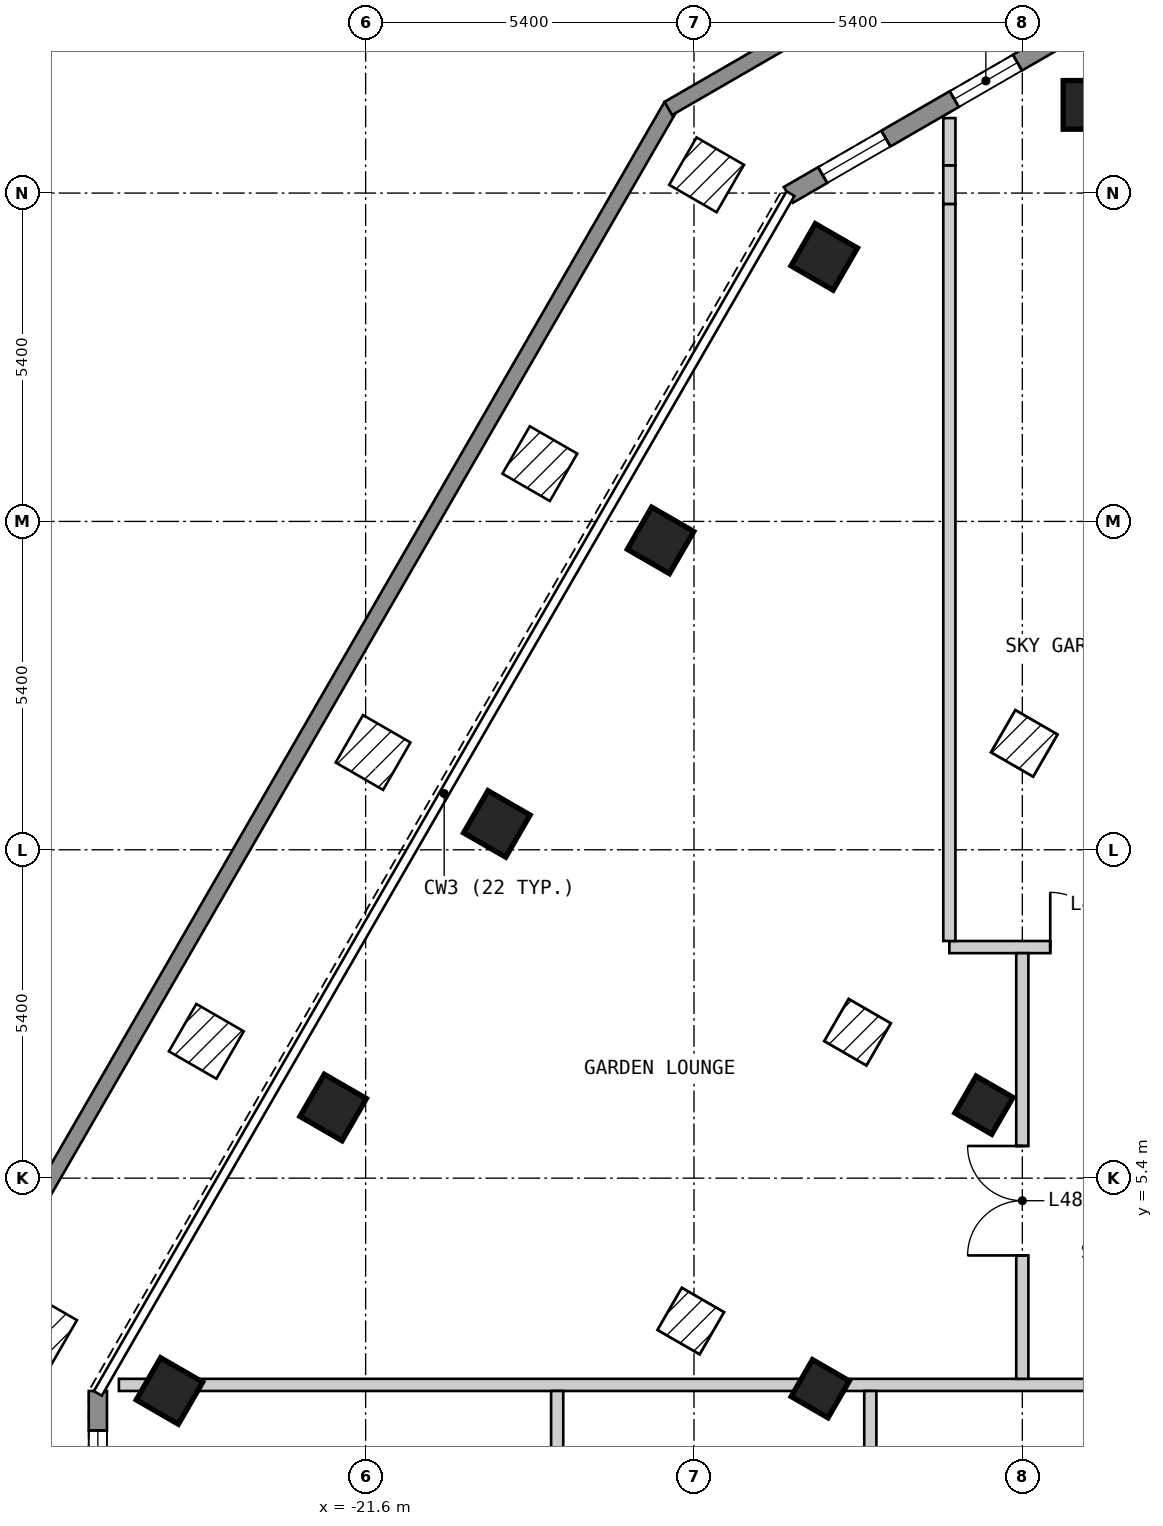
"""IFC4 building model, lengths in metres.
Left out: names, types, materials, properties, quantities, classifications, styles, units other than length and angle.
Written with IfcOpenShell. Run it as: python <this file> out.ifc"""

import sys

from ifc_helpers import new_model, si_unit, direction, frame, frame_2d, origin, origin_2d, place, context, subcontext, project, spatial, polyline, rectangle, outline, extrude, element, fill, save


model = new_model("IFC4")
c1 = context("Model", 3, precision=1e-05, world=origin(), true_north=direction((0.0, 1.0)))
c2 = subcontext(c1, "Body", "Model", "MODEL_VIEW")
j1 = project(units=[si_unit("LENGTHUNIT", "METRE"), si_unit("PLANEANGLEUNIT", "RADIAN")], contexts=[c1])
p1 = place(None, origin())
s1 = spatial("IfcSite", under=j1, at=p1, CompositionType="ELEMENT")
p2 = place(p1, origin())
s2 = spatial("IfcBuilding", under=s1, at=p2, CompositionType="ELEMENT")
p3 = place(p2, frame((0.0, 0.0, 157.2)))
s3 = spatial("IfcBuildingStorey", under=s2, at=p3, CompositionType="ELEMENT", Elevation=157.2)
for number, where, z_axis, x_axis in (
    (1, (-9.728, 23.05, 0.0), (0.0, 0.0, 1.0), (-1.0, 0.0, 0.0)),
    (2, (-14.058, 20.55, 0.0), (0.0, 0.0, 1.0), (-0.5, -0.866, 0.0)),
    (3, (-16.75, 15.888, 0.0), (0.0, 0.0, 1.0), (-0.5, -0.866, 0.0)),
    (4, (-19.442, 11.225, 0.0), (0.0, 0.0, 1.0), (-0.5, -0.866, 0.0)),
    (5, (-22.134, 6.562, 0.0), (0.0, 0.0, 1.0), (-0.5, -0.866, 0.0)),
    (6, (-24.826, 1.9, 0.0), (0.0, 0.0, 1.0), (-0.5, -0.866, 0.0)),
):
    element("IfcColumn", number, at=place(p3, frame(where, z_axis=z_axis, x_axis=x_axis)), inside=s3, PredefinedType="COLUMN", context=c2, shape_type="SweptSolid", body=[
        extrude(rectangle(XDim=0.8, YDim=0.8, at=origin_2d()), origin(), (0.0, 0.0, 1.0), 6.0),
    ])
for number, where, z_axis, x_axis in (
    (7, (-11.431, 6.6, 0.0), (0.0, 0.0, 1.0), (-0.5, -0.866, 0.0)),
    (8, (-14.123, 1.937, 0.0), (0.0, 0.0, 1.0), (-0.5, -0.866, 0.0)),
):
    element("IfcColumn", number, at=place(p3, frame(where, z_axis=z_axis, x_axis=x_axis)), inside=s3, PredefinedType="COLUMN", context=c2, shape_type="SweptSolid", body=[
        extrude(rectangle(XDim=0.7, YDim=0.7, at=origin_2d()), origin(), (0.0, 0.0, 1.0), 6.0),
    ])
p4 = place(p3, frame((-10.317, 24.07, 0.0), z_axis=(0.0, 0.0, 1.0), x_axis=(-0.866022959057, -0.500004234368, 0.0)))
e9 = element("IfcWall", 9, at=p4, inside=s3, PredefinedType="SOLIDWALL", context=c2, shape_type="SweptSolid", body=[
    extrude(outline(polyline([(0.0, -0.15), (5.0, -0.15), (4.92, 0.15), (0.08, 0.15), (0.0, -0.15)])), origin(), (0.0, 0.0, 1.0), 5.7),
])
p5 = place(p4, frame((0.65, 0.0, 0.15)))
e10 = element("IfcOpeningElement", 10, at=p5, cuts=e9, PredefinedType="OPENING", context=c2, shape_type="SweptSolid", body=[
    extrude(rectangle(XDim=1.2, YDim=2.1, at=frame_2d((0.6, 1.05))), frame((0.0, 0.16, 0.0), z_axis=(0.0, -1.0, 0.0), x_axis=(1.0, 0.0, 0.0)), (0.0, 0.0, 1.0), 0.32),
])
p6 = place(p4, frame((3.149, 0.0, 0.15)))
e11 = element("IfcOpeningElement", 11, at=p6, cuts=e9, PredefinedType="OPENING", context=c2, shape_type="SweptSolid", body=[
    extrude(rectangle(XDim=1.2, YDim=2.1, at=frame_2d((0.6, 1.05))), frame((0.0, 0.16, 0.0), z_axis=(0.0, -1.0, 0.0), x_axis=(1.0, 0.0, 0.0)), (0.0, 0.0, 1.0), 0.32),
])
p7 = place(p3, frame((-26.004, 1.9, 0.0), z_axis=(0.0, 0.0, 1.0), x_axis=(0.0, -1.0, 0.0)))
e12 = element("IfcWall", 12, at=p7, inside=s3, PredefinedType="SOLIDWALL", context=c2, shape_type="SweptSolid", body=[
    extrude(outline(polyline([(0.0, -0.15), (5.0, -0.15), (4.92, 0.15), (0.08, 0.15), (0.0, -0.15)])), origin(), (0.0, 0.0, 1.0), 5.7),
])
p8 = place(p7, frame((0.65, 0.0, 0.15)))
e13 = element("IfcOpeningElement", 13, at=p8, cuts=e12, PredefinedType="OPENING", context=c2, shape_type="SweptSolid", body=[
    extrude(rectangle(XDim=1.2, YDim=2.1, at=frame_2d((0.6, 1.05))), frame((0.0, 0.16, 0.0), z_axis=(0.0, -1.0, 0.0), x_axis=(1.0, 0.0, 0.0)), (0.0, 0.0, 1.0), 0.32),
])
p9 = place(p7, frame((3.15, 0.0, 0.15)))
e14 = element("IfcOpeningElement", 14, at=p9, cuts=e12, PredefinedType="OPENING", context=c2, shape_type="SweptSolid", body=[
    extrude(rectangle(XDim=1.2, YDim=2.1, at=frame_2d((0.6, 1.05))), frame((0.0, 0.16, 0.0), z_axis=(0.0, -1.0, 0.0), x_axis=(1.0, 0.0, 0.0)), (0.0, 0.0, 1.0), 0.32),
])
p10 = place(p3, frame((-28.24, 2.838, 0.0), z_axis=(0.0, 0.0, 1.0), x_axis=(0.500065532695, 0.865987565159, 0.0)))
e15 = element("IfcWall", 15, at=p10, inside=s3, PredefinedType="PARAPET", context=c2, shape_type="SweptSolid", body=[
    extrude(outline(polyline([(0.067, -0.125), (23.258, -0.125), (23.325, 0.125), (0.0, 0.125), (0.067, -0.125)])), origin(), (0.0, 0.0, 1.0), 1.6),
])
p11 = place(p3, frame((-16.622, 22.991, 0.0), z_axis=(0.0, 0.0, 1.0), x_axis=(0.865889515344, 0.500235291855, 0.0)))
e16 = element("IfcWall", 16, at=p11, inside=s3, PredefinedType="PARAPET", context=c2, shape_type="SweptSolid", body=[
    extrude(outline(polyline([(0.067, -0.125), (4.933, -0.125), (5.0, 0.125), (0.0, 0.125), (0.067, -0.125)])), origin(), (0.0, 0.0, 1.0), 1.6),
])
p12 = place(p3, frame((-25.658, 2.0, 0.0), z_axis=(0.0, 0.0, 1.0), x_axis=(1.0, 0.0, 0.0)))
e17 = element("IfcWall", 17, at=p12, inside=s3, PredefinedType="PARTITIONING", context=c2, shape_type="SweptSolid", body=[
    extrude(rectangle(XDim=0.637, YDim=0.2, at=frame_2d((0.318, 0.0))), origin(), (0.0, 0.0, 1.0), 5.7),
])
p13 = place(p3, frame((-25.021, 2.0, 0.0), z_axis=(0.0, 0.0, 1.0), x_axis=(1.0, 0.0, 0.0)))
e18 = element("IfcWall", 18, at=p13, inside=s3, PredefinedType="PARTITIONING", context=c2, shape_type="SweptSolid", body=[
    extrude(rectangle(XDim=0.57, YDim=0.2, at=frame_2d((0.285, 0.0))), origin(), (0.0, 0.0, 1.0), 5.12),
])
p14 = place(p3, frame((-24.451, 2.0, 0.0), z_axis=(0.0, 0.0, 1.0), x_axis=(1.0, 0.0, 0.0)))
e19 = element("IfcWall", 19, at=p14, inside=s3, PredefinedType="PARTITIONING", context=c2, shape_type="SweptSolid", body=[
    extrude(rectangle(XDim=37.451, YDim=0.2, at=frame_2d((18.726, 0.0))), origin(), (0.0, 0.0, 1.0), 5.7),
])
p15 = place(p14, frame((32.887, 0.0, 0.0)))
e20 = element("IfcOpeningElement", 20, at=p15, cuts=e19, PredefinedType="OPENING", context=c2, shape_type="SweptSolid", body=[
    extrude(rectangle(XDim=1.8, YDim=2.1, at=frame_2d((0.9, 1.05))), frame((0.0, 0.11, 0.0), z_axis=(0.0, -1.0, 0.0), x_axis=(1.0, 0.0, 0.0)), (0.0, 0.0, 1.0), 0.22),
])
p16 = place(p14, frame((23.551, 0.0, 0.0)))
e21 = element("IfcOpeningElement", 21, at=p16, cuts=e19, PredefinedType="OPENING", context=c2, shape_type="SweptSolid", body=[
    extrude(rectangle(XDim=1.8, YDim=2.1, at=frame_2d((0.9, 1.05))), frame((0.0, 0.11, 0.0), z_axis=(0.0, -1.0, 0.0), x_axis=(1.0, 0.0, 0.0)), (0.0, 0.0, 1.0), 0.22),
])
p17 = place(p14, frame((15.553, 0.0, 0.0)))
e22 = element("IfcOpeningElement", 22, at=p17, cuts=e19, PredefinedType="OPENING", context=c2, shape_type="SweptSolid", body=[
    extrude(rectangle(XDim=1.8, YDim=2.1, at=frame_2d((0.9, 1.05))), frame((0.0, 0.11, 0.0), z_axis=(0.0, -1.0, 0.0), x_axis=(1.0, 0.0, 0.0)), (0.0, 0.0, 1.0), 0.22),
])
p18 = place(p3, frame((-12.0, 9.2, 0.0), z_axis=(0.0, 0.0, 1.0), x_axis=(1.0, 0.0, 0.0)))
e23 = element("IfcWall", 23, at=p18, inside=s3, PredefinedType="PARTITIONING", context=c2, shape_type="SweptSolid", body=[
    extrude(rectangle(XDim=3.837, YDim=0.2, at=frame_2d((1.918, 0.0))), origin(), (0.0, 0.0, 1.0), 5.7),
])
p19 = place(p18, frame((1.659, 0.0, 0.0)))
e24 = element("IfcOpeningElement", 24, at=p19, cuts=e23, PredefinedType="OPENING", context=c2, shape_type="SweptSolid", body=[
    extrude(rectangle(XDim=1.8, YDim=2.1, at=frame_2d((0.9, 1.05))), frame((0.0, 0.11, 0.0), z_axis=(0.0, -1.0, 0.0), x_axis=(1.0, 0.0, 0.0)), (0.0, 0.0, 1.0), 0.22),
])
p20 = place(p3, frame((-18.45, -7.9, 0.0), z_axis=(0.0, 0.0, 1.0), x_axis=(0.0, 1.0, 0.0)))
e25 = element("IfcWall", 25, at=p20, inside=s3, PredefinedType="PARTITIONING", context=c2, shape_type="SweptSolid", body=[
    extrude(rectangle(XDim=9.8, YDim=0.2, at=frame_2d((4.9, 0.0))), origin(), (0.0, 0.0, 1.0), 5.7),
])
p21 = place(p20, frame((4.4, 0.0, 0.0)))
e26 = element("IfcOpeningElement", 26, at=p21, cuts=e25, PredefinedType="OPENING", context=c2, shape_type="SweptSolid", body=[
    extrude(rectangle(XDim=1.0, YDim=2.1, at=frame_2d((0.5, 1.05))), frame((0.0, 0.11, 0.0), z_axis=(0.0, -1.0, 0.0), x_axis=(1.0, 0.0, 0.0)), (0.0, 0.0, 1.0), 0.22),
])
p22 = place(p3, frame((-13.3, -4.88, 0.0), z_axis=(0.0, 0.0, 1.0), x_axis=(0.0, 1.0, 0.0)))
e27 = element("IfcWall", 27, at=p22, inside=s3, PredefinedType="PARTITIONING", context=c2, shape_type="SweptSolid", body=[
    extrude(rectangle(XDim=6.78, YDim=0.2, at=frame_2d((3.39, 0.0))), origin(), (0.0, 0.0, 1.0), 5.7),
])
p23 = place(p22, frame((2.869, 0.0, 0.0)))
e28 = element("IfcOpeningElement", 28, at=p23, cuts=e27, PredefinedType="OPENING", context=c2, shape_type="SweptSolid", body=[
    extrude(rectangle(XDim=1.8, YDim=2.1, at=frame_2d((0.9, 1.05))), frame((0.0, 0.11, 0.0), z_axis=(0.0, -1.0, 0.0), x_axis=(1.0, 0.0, 0.0)), (0.0, 0.0, 1.0), 0.22),
])
p24 = place(p3, frame((-12.0, 9.3, 0.0), z_axis=(0.0, 0.0, 1.0), x_axis=(0.0, 1.0, 0.0)))
e29 = element("IfcWall", 29, at=p24, inside=s3, PredefinedType="PARTITIONING", context=c2, shape_type="SweptSolid", body=[
    extrude(rectangle(XDim=12.121, YDim=0.2, at=frame_2d((6.061, 0.0))), origin(), (0.0, 0.0, 1.0), 5.7),
])
p25 = place(p3, frame((-12.0, 21.421, 0.0), z_axis=(0.0, 0.0, 1.0), x_axis=(0.0, 1.0, 0.0)))
e30 = element("IfcWall", 30, at=p25, inside=s3, PredefinedType="PARTITIONING", context=c2, shape_type="SweptSolid", body=[
    extrude(rectangle(XDim=0.635, YDim=0.2, at=frame_2d((0.317, 0.0))), origin(), (0.0, 0.0, 1.0), 5.12),
])
p26 = place(p3, frame((-12.0, 22.056, 0.0), z_axis=(0.0, 0.0, 1.0), x_axis=(0.0, 1.0, 0.0)))
e31 = element("IfcWall", 31, at=p26, inside=s3, PredefinedType="PARTITIONING", context=c2, shape_type="SweptSolid", body=[
    extrude(rectangle(XDim=0.777, YDim=0.2, at=frame_2d((0.389, 0.0))), origin(), (0.0, 0.0, 1.0), 5.7),
])
p27 = place(p3, frame((-10.8, 2.1, 0.0), z_axis=(0.0, 0.0, 1.0), x_axis=(0.0, 1.0, 0.0)))
e32 = element("IfcWall", 32, at=p27, inside=s3, PredefinedType="PARTITIONING", context=c2, shape_type="SweptSolid", body=[
    extrude(rectangle(XDim=7.0, YDim=0.2, at=frame_2d((3.5, 0.0))), origin(), (0.0, 0.0, 1.0), 5.7),
])
p28 = place(p27, frame((2.029, 0.0, 0.0)))
e33 = element("IfcOpeningElement", 33, at=p28, cuts=e32, PredefinedType="OPENING", context=c2, shape_type="SweptSolid", body=[
    extrude(rectangle(XDim=1.8, YDim=2.1, at=frame_2d((0.9, 1.05))), frame((0.0, 0.11, 0.0), z_axis=(0.0, -1.0, 0.0), x_axis=(1.0, 0.0, 0.0)), (0.0, 0.0, 1.0), 0.22),
])
p29 = place(p5, origin())
e34 = element("IfcWindow", 34, at=p29, inside=s3, PartitioningType="SINGLE_PANEL", PredefinedType="WINDOW", context=c2, shape_type="SweptSolid", body=[
    extrude(rectangle(XDim=1.2, YDim=2.1, at=frame_2d((0.6, 1.05))), frame((0.0, 0.03, 0.0), z_axis=(0.0, -1.0, 0.0), x_axis=(1.0, 0.0, 0.0)), (0.0, 0.0, 1.0), 0.06),
])
fill(e10, e34)
p30 = place(p6, origin())
e35 = element("IfcWindow", 35, at=p30, inside=s3, PartitioningType="SINGLE_PANEL", PredefinedType="WINDOW", context=c2, shape_type="SweptSolid", body=[
    extrude(rectangle(XDim=1.2, YDim=2.1, at=frame_2d((0.6, 1.05))), frame((0.0, 0.03, 0.0), z_axis=(0.0, -1.0, 0.0), x_axis=(1.0, 0.0, 0.0)), (0.0, 0.0, 1.0), 0.06),
])
fill(e11, e35)
p31 = place(p8, origin())
e36 = element("IfcWindow", 36, at=p31, inside=s3, PartitioningType="SINGLE_PANEL", PredefinedType="WINDOW", context=c2, shape_type="SweptSolid", body=[
    extrude(rectangle(XDim=1.2, YDim=2.1, at=frame_2d((0.6, 1.05))), frame((0.0, 0.03, 0.0), z_axis=(0.0, -1.0, 0.0), x_axis=(1.0, 0.0, 0.0)), (0.0, 0.0, 1.0), 0.06),
])
fill(e13, e36)
p32 = place(p19, origin())
e37 = element("IfcDoor", 37, at=p32, inside=s3, OperationType="DOUBLE_DOOR_SINGLE_SWING", PredefinedType="DOOR", context=c2, shape_type="SweptSolid", body=[
    extrude(rectangle(XDim=1.8, YDim=2.1, at=frame_2d((0.9, 1.05))), frame((0.0, 0.025, 0.0), z_axis=(0.0, -1.0, 0.0), x_axis=(1.0, 0.0, 0.0)), (0.0, 0.0, 1.0), 0.05),
])
fill(e24, e37)
p33 = place(p28, origin())
e38 = element("IfcDoor", 38, at=p33, inside=s3, OperationType="DOUBLE_DOOR_SINGLE_SWING", PredefinedType="DOOR", context=c2, shape_type="SweptSolid", body=[
    extrude(rectangle(XDim=1.8, YDim=2.1, at=frame_2d((0.9, 1.05))), frame((0.0, 0.025, 0.0), z_axis=(0.0, -1.0, 0.0), x_axis=(1.0, 0.0, 0.0)), (0.0, 0.0, 1.0), 0.05),
])
fill(e33, e38)
save(model, sys.argv[1])
